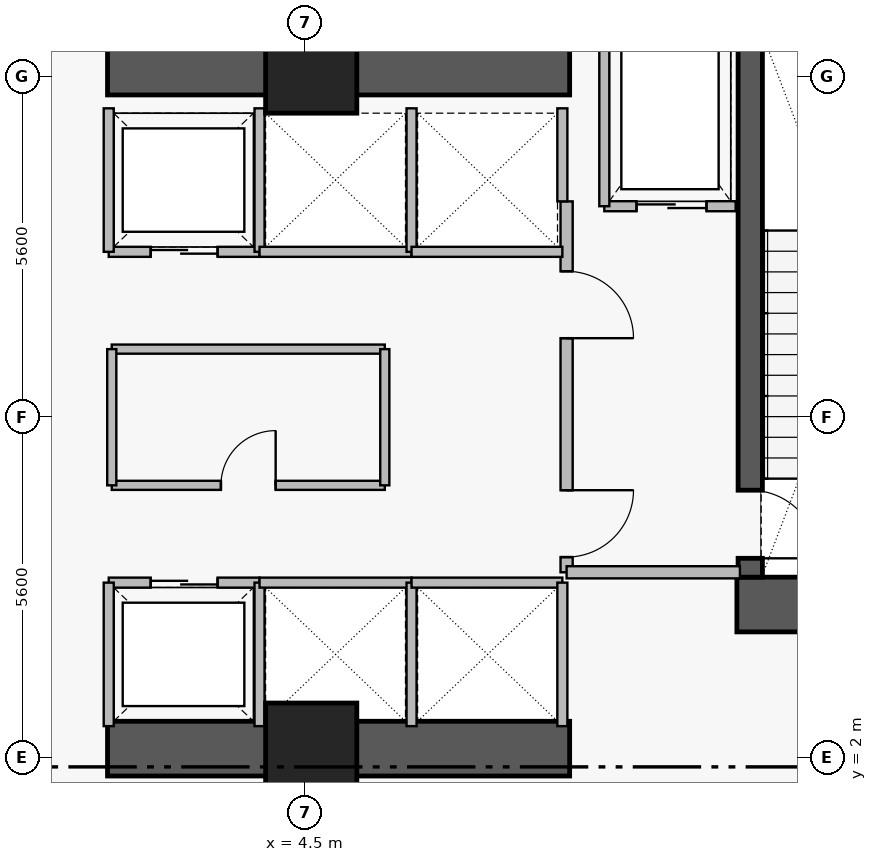
"""IFC4 building model, lengths in metres.
Left out: names, types, materials, properties, quantities, classifications, styles, units other than length and angle.
Written with IfcOpenShell. Run it as: python <this file> out.ifc"""

import sys

from ifc_helpers import new_model, si_unit, direction, frame, frame_2d, origin, origin_2d, place, context, subcontext, project, spatial, rectangle, extrude, element, fill, save


model = new_model("IFC4")
c1 = context("Model", 3, precision=1e-05, world=origin(), true_north=direction((0.0, 1.0)))
c2 = subcontext(c1, "Body", "Model", "MODEL_VIEW")
j1 = project(units=[si_unit("LENGTHUNIT", "METRE"), si_unit("PLANEANGLEUNIT", "RADIAN")], contexts=[c1])
p1 = place(None, origin())
s1 = spatial("IfcSite", under=j1, at=p1, CompositionType="ELEMENT")
p2 = place(p1, origin())
s2 = spatial("IfcBuilding", under=s1, at=p2, CompositionType="ELEMENT")
p3 = place(p2, frame((0.0, 0.0, 18.0)))
s3 = spatial("IfcBuildingStorey", under=s2, at=p3, CompositionType="ELEMENT", Elevation=18.0)
p4 = place(p3, frame((11.6, 4.52, 0.0), z_axis=(0.0, 0.0, 1.0), x_axis=(1.0, 0.0, 0.0)))
e1 = element("IfcWall", 1, at=p4, inside=s3, PredefinedType="SHEAR", context=c2, shape_type="SweptSolid", body=[
    extrude(rectangle(XDim=4.71, YDim=0.9, at=frame_2d((2.355, 0.0))), origin(), (0.0, 0.0, 1.0), 4.61),
])
for number, where, z_axis, x_axis in (
    (2, (1.25, 2.15, 0.0), (0.0, 0.0, 1.0), (1.0, 0.0, 0.0)),
    (3, (1.25, 13.35, 0.0), (0.0, 0.0, 1.0), (1.0, 0.0, 0.0)),
):
    element("IfcWall", number, at=place(p3, frame(where, z_axis=z_axis, x_axis=x_axis)), inside=s3, PredefinedType="SHEAR", context=c2, shape_type="SweptSolid", body=[
        extrude(rectangle(XDim=7.6, YDim=0.9, at=frame_2d((3.8, 0.0))), origin(), (0.0, 0.0, 1.0), 4.54),
    ])
p5 = place(p3, frame((11.82, 13.93, 0.0), z_axis=(0.0, 0.0, 1.0), x_axis=(0.0, -1.0, 0.0)))
e4 = element("IfcWall", 4, at=p5, inside=s3, PredefinedType="SHEAR", context=c2, shape_type="SweptSolid", body=[
    extrude(rectangle(XDim=8.96, YDim=0.4, at=frame_2d((4.48, 0.0))), origin(), (0.0, 0.0, 1.0), 4.61),
])
p6 = place(p5, frame((7.53, 0.0, 0.0)))
e5 = element("IfcOpeningElement", 5, at=p6, cuts=e4, PredefinedType="OPENING", context=c2, shape_type="SweptSolid", body=[
    extrude(rectangle(XDim=1.12, YDim=2.22, at=frame_2d((0.56, 1.11))), frame((0.0, 0.21, 0.0), z_axis=(0.0, -1.0, 0.0), x_axis=(1.0, 0.0, 0.0)), (0.0, 0.0, 1.0), 0.42),
])
for number, where, z_axis, x_axis in (
    (6, (4.6, 13.35, 0.0), (0.0, 0.0, 1.0), (1.0, 0.0, 0.0)),
    (7, (4.6, 2.15, 0.0), (0.0, 0.0, 1.0), (1.0, 0.0, 0.0)),
):
    element("IfcColumn", number, at=place(p3, frame(where, z_axis=z_axis, x_axis=x_axis)), inside=s3, PredefinedType="COLUMN", context=c2, shape_type="SweptSolid", body=[
        extrude(rectangle(XDim=1.5, YDim=1.5, at=origin_2d()), origin(), (0.0, 0.0, 1.0), 4.8),
    ])
p7 = place(p3, frame((8.8, 11.15, 0.0), z_axis=(0.0, 0.0, 1.0), x_axis=(0.0, -1.0, 0.0)))
e8 = element("IfcWall", 8, at=p7, inside=s3, PredefinedType="PARTITIONING", context=c2, shape_type="SweptSolid", body=[
    extrude(rectangle(XDim=6.1, YDim=0.2, at=frame_2d((3.05, 0.0))), origin(), (0.0, 0.0, 1.0), 4.54),
])
p8 = place(p7, frame((1.15, 0.0, 0.0)))
e9 = element("IfcOpeningElement", 9, at=p8, cuts=e8, PredefinedType="OPENING", context=c2, shape_type="SweptSolid", body=[
    extrude(rectangle(XDim=1.1, YDim=2.2, at=frame_2d((0.55, 1.1))), frame((0.0, 0.11, 0.0), z_axis=(0.0, -1.0, 0.0), x_axis=(1.0, 0.0, 0.0)), (0.0, 0.0, 1.0), 0.22),
])
p9 = place(p7, frame((4.75, 0.0, 0.0)))
e10 = element("IfcOpeningElement", 10, at=p9, cuts=e8, PredefinedType="OPENING", context=c2, shape_type="SweptSolid", body=[
    extrude(rectangle(XDim=1.1, YDim=2.2, at=frame_2d((0.55, 1.1))), frame((0.0, 0.11, 0.0), z_axis=(0.0, -1.0, 0.0), x_axis=(1.0, 0.0, 0.0)), (0.0, 0.0, 1.0), 0.22),
])
p10 = place(p3, frame((9.42, 11.07, 0.0), z_axis=(0.0, 0.0, 1.0), x_axis=(1.0, 0.0, 0.0)))
e11 = element("IfcWall", 11, at=p10, inside=s3, PredefinedType="PARTITIONING", context=c2, shape_type="SweptSolid", body=[
    extrude(rectangle(XDim=2.16, YDim=0.165, at=frame_2d((1.08, 0.0))), origin(), (0.0, 0.0, 1.0), 4.54),
])
p11 = place(p10, frame((0.53, 0.0, 0.0)))
e12 = element("IfcOpeningElement", 12, at=p11, cuts=e11, PredefinedType="OPENING", context=c2, shape_type="SweptSolid", body=[
    extrude(rectangle(XDim=1.15, YDim=2.25, at=frame_2d((0.575, 1.125))), frame((0.0, 0.093, 0.0), z_axis=(0.0, -1.0, 0.0), x_axis=(1.0, 0.0, 0.0)), (0.0, 0.0, 1.0), 0.185),
])
p12 = place(p3, frame((1.27, 4.88, 0.0), z_axis=(0.0, 0.0, 1.0), x_axis=(1.0, 0.0, 0.0)))
e13 = element("IfcWall", 13, at=p12, inside=s3, PredefinedType="PARTITIONING", context=c2, shape_type="SweptSolid", body=[
    extrude(rectangle(XDim=2.48, YDim=0.165, at=frame_2d((1.24, 0.0))), origin(), (0.0, 0.0, 1.0), 4.54),
])
p13 = place(p12, frame((0.69, 0.0, 0.0)))
e14 = element("IfcOpeningElement", 14, at=p13, cuts=e13, PredefinedType="OPENING", context=c2, shape_type="SweptSolid", body=[
    extrude(rectangle(XDim=1.1, YDim=2.25, at=frame_2d((0.55, 1.125))), frame((0.0, 0.093, 0.0), z_axis=(0.0, -1.0, 0.0), x_axis=(1.0, 0.0, 0.0)), (0.0, 0.0, 1.0), 0.185),
])
p14 = place(p3, frame((1.27, 10.32, 0.0), z_axis=(0.0, 0.0, 1.0), x_axis=(1.0, 0.0, 0.0)))
e15 = element("IfcWall", 15, at=p14, inside=s3, PredefinedType="PARTITIONING", context=c2, shape_type="SweptSolid", body=[
    extrude(rectangle(XDim=2.48, YDim=0.165, at=frame_2d((1.24, 0.0))), origin(), (0.0, 0.0, 1.0), 4.54),
])
p15 = place(p14, frame((0.69, 0.0, 0.0)))
e16 = element("IfcOpeningElement", 16, at=p15, cuts=e15, PredefinedType="OPENING", context=c2, shape_type="SweptSolid", body=[
    extrude(rectangle(XDim=1.1, YDim=2.25, at=frame_2d((0.55, 1.125))), frame((0.0, 0.093, 0.0), z_axis=(0.0, -1.0, 0.0), x_axis=(1.0, 0.0, 0.0)), (0.0, 0.0, 1.0), 0.185),
])
p16 = place(p3, frame((1.32, 6.48, 0.0), z_axis=(0.0, 0.0, 1.0), x_axis=(1.0, 0.0, 0.0)))
e17 = element("IfcWall", 17, at=p16, inside=s3, PredefinedType="PARTITIONING", context=c2, shape_type="SweptSolid", body=[
    extrude(rectangle(XDim=4.49, YDim=0.15, at=frame_2d((2.245, 0.0))), origin(), (0.0, 0.0, 1.0), 4.54),
])
p17 = place(p16, frame((1.795, 0.0, 0.0)))
e18 = element("IfcOpeningElement", 18, at=p17, cuts=e17, PredefinedType="OPENING", context=c2, shape_type="SweptSolid", body=[
    extrude(rectangle(XDim=0.9, YDim=2.15, at=frame_2d((0.45, 1.075))), frame((0.0, 0.085, 0.0), z_axis=(0.0, -1.0, 0.0), x_axis=(1.0, 0.0, 0.0)), (0.0, 0.0, 1.0), 0.17),
])
p18 = place(p3, frame((8.8, 5.05, 0.0), z_axis=(0.0, 0.0, 1.0), x_axis=(1.0, 0.0, 0.0)))
e19 = element("IfcWall", 19, at=p18, inside=s3, PredefinedType="PARTITIONING", context=c2, shape_type="SweptSolid", body=[
    extrude(rectangle(XDim=2.85, YDim=0.2, at=frame_2d((1.425, 0.0))), origin(), (0.0, 0.0, 1.0), 4.54),
])
p19 = place(p3, frame((9.42, 11.07, 0.0), z_axis=(0.0, 0.0, 1.0), x_axis=(0.0, 1.0, 0.0)))
e20 = element("IfcWall", 20, at=p19, inside=s3, PredefinedType="PARTITIONING", context=c2, shape_type="SweptSolid", body=[
    extrude(rectangle(XDim=2.96, YDim=0.165, at=frame_2d((1.48, 0.0))), origin(), (0.0, 0.0, 1.0), 4.54),
])
for number, where, z_axis, x_axis in (
    (21, (1.27, 2.52, 0.0), (0.0, 0.0, 1.0), (0.0, 1.0, 0.0)),
    (22, (3.75, 2.52, 0.0), (0.0, 0.0, 1.0), (0.0, 1.0, 0.0)),
    (23, (1.27, 10.32, 0.0), (0.0, 0.0, 1.0), (0.0, 1.0, 0.0)),
    (24, (3.75, 10.32, 0.0), (0.0, 0.0, 1.0), (0.0, 1.0, 0.0)),
):
    element("IfcWall", number, at=place(p3, frame(where, z_axis=z_axis, x_axis=x_axis)), inside=s3, PredefinedType="PARTITIONING", context=c2, shape_type="SweptSolid", body=[
        extrude(rectangle(XDim=2.36, YDim=0.165, at=frame_2d((1.18, 0.0))), origin(), (0.0, 0.0, 1.0), 4.54),
    ])
p20 = place(p3, frame((3.75, 4.88, 0.0), z_axis=(0.0, 0.0, 1.0), x_axis=(1.0, 0.0, 0.0)))
e25 = element("IfcWall", 25, at=p20, inside=s3, PredefinedType="PARTITIONING", context=c2, shape_type="SweptSolid", body=[
    extrude(rectangle(XDim=2.5, YDim=0.165, at=frame_2d((1.25, 0.0))), origin(), (0.0, 0.0, 1.0), 4.54),
])
p21 = place(p3, frame((6.25, 2.52, 0.0), z_axis=(0.0, 0.0, 1.0), x_axis=(0.0, 1.0, 0.0)))
e26 = element("IfcWall", 26, at=p21, inside=s3, PredefinedType="PARTITIONING", context=c2, shape_type="SweptSolid", body=[
    extrude(rectangle(XDim=2.36, YDim=0.165, at=frame_2d((1.18, 0.0))), origin(), (0.0, 0.0, 1.0), 4.54),
])
p22 = place(p3, frame((6.25, 4.88, 0.0), z_axis=(0.0, 0.0, 1.0), x_axis=(1.0, 0.0, 0.0)))
e27 = element("IfcWall", 27, at=p22, inside=s3, PredefinedType="PARTITIONING", context=c2, shape_type="SweptSolid", body=[
    extrude(rectangle(XDim=2.48, YDim=0.165, at=frame_2d((1.24, 0.0))), origin(), (0.0, 0.0, 1.0), 4.54),
])
p23 = place(p3, frame((8.73, 2.52, 0.0), z_axis=(0.0, 0.0, 1.0), x_axis=(0.0, 1.0, 0.0)))
e28 = element("IfcWall", 28, at=p23, inside=s3, PredefinedType="PARTITIONING", context=c2, shape_type="SweptSolid", body=[
    extrude(rectangle(XDim=2.36, YDim=0.165, at=frame_2d((1.18, 0.0))), origin(), (0.0, 0.0, 1.0), 4.54),
])
p24 = place(p3, frame((3.75, 10.32, 0.0), z_axis=(0.0, 0.0, 1.0), x_axis=(1.0, 0.0, 0.0)))
e29 = element("IfcWall", 29, at=p24, inside=s3, PredefinedType="PARTITIONING", context=c2, shape_type="SweptSolid", body=[
    extrude(rectangle(XDim=2.5, YDim=0.165, at=frame_2d((1.25, 0.0))), origin(), (0.0, 0.0, 1.0), 4.54),
])
p25 = place(p3, frame((6.25, 10.32, 0.0), z_axis=(0.0, 0.0, 1.0), x_axis=(0.0, 1.0, 0.0)))
e30 = element("IfcWall", 30, at=p25, inside=s3, PredefinedType="PARTITIONING", context=c2, shape_type="SweptSolid", body=[
    extrude(rectangle(XDim=2.36, YDim=0.165, at=frame_2d((1.18, 0.0))), origin(), (0.0, 0.0, 1.0), 4.54),
])
p26 = place(p3, frame((6.25, 10.32, 0.0), z_axis=(0.0, 0.0, 1.0), x_axis=(1.0, 0.0, 0.0)))
e31 = element("IfcWall", 31, at=p26, inside=s3, PredefinedType="PARTITIONING", context=c2, shape_type="SweptSolid", body=[
    extrude(rectangle(XDim=2.48, YDim=0.165, at=frame_2d((1.24, 0.0))), origin(), (0.0, 0.0, 1.0), 4.54),
])
p27 = place(p3, frame((8.73, 11.15, 0.0), z_axis=(0.0, 0.0, 1.0), x_axis=(0.0, 1.0, 0.0)))
e32 = element("IfcWall", 32, at=p27, inside=s3, PredefinedType="PARTITIONING", context=c2, shape_type="SweptSolid", body=[
    extrude(rectangle(XDim=1.53, YDim=0.165, at=frame_2d((0.765, 0.0))), origin(), (0.0, 0.0, 1.0), 4.54),
])
p28 = place(p3, frame((1.32, 8.72, 0.0), z_axis=(0.0, 0.0, 1.0), x_axis=(1.0, 0.0, 0.0)))
e33 = element("IfcWall", 33, at=p28, inside=s3, PredefinedType="PARTITIONING", context=c2, shape_type="SweptSolid", body=[
    extrude(rectangle(XDim=4.49, YDim=0.15, at=frame_2d((2.245, 0.0))), origin(), (0.0, 0.0, 1.0), 4.54),
])
for number, where, z_axis, x_axis in (
    (34, (1.32, 6.48, 0.0), (0.0, 0.0, 1.0), (0.0, 1.0, 0.0)),
    (35, (5.81, 6.48, 0.0), (0.0, 0.0, 1.0), (0.0, 1.0, 0.0)),
):
    element("IfcWall", number, at=place(p3, frame(where, z_axis=z_axis, x_axis=x_axis)), inside=s3, PredefinedType="PARTITIONING", context=c2, shape_type="SweptSolid", body=[
        extrude(rectangle(XDim=2.24, YDim=0.15, at=frame_2d((1.12, 0.0))), origin(), (0.0, 0.0, 1.0), 4.54),
    ])
p29 = place(p6, origin())
e36 = element("IfcDoor", 36, at=p29, inside=s3, OperationType="SINGLE_SWING_RIGHT", PredefinedType="DOOR", context=c2, shape_type="SweptSolid", body=[
    extrude(rectangle(XDim=1.12, YDim=2.22, at=frame_2d((0.56, 1.11))), frame((0.0, 0.025, 0.0), z_axis=(0.0, -1.0, 0.0), x_axis=(1.0, 0.0, 0.0)), (0.0, 0.0, 1.0), 0.05),
])
fill(e5, e36)
p30 = place(p8, origin())
e37 = element("IfcDoor", 37, at=p30, inside=s3, OperationType="SINGLE_SWING_RIGHT", PredefinedType="DOOR", context=c2, shape_type="SweptSolid", body=[
    extrude(rectangle(XDim=1.1, YDim=2.2, at=frame_2d((0.55, 1.1))), frame((0.0, 0.025, 0.0), z_axis=(0.0, -1.0, 0.0), x_axis=(1.0, 0.0, 0.0)), (0.0, 0.0, 1.0), 0.05),
])
fill(e9, e37)
p31 = place(p9, origin())
e38 = element("IfcDoor", 38, at=p31, inside=s3, OperationType="SINGLE_SWING_LEFT", PredefinedType="DOOR", context=c2, shape_type="SweptSolid", body=[
    extrude(rectangle(XDim=1.1, YDim=2.2, at=frame_2d((0.55, 1.1))), frame((0.0, 0.025, 0.0), z_axis=(0.0, -1.0, 0.0), x_axis=(1.0, 0.0, 0.0)), (0.0, 0.0, 1.0), 0.05),
])
fill(e10, e38)
p32 = place(p11, origin())
e39 = element("IfcDoor", 39, at=p32, inside=s3, OperationType="SLIDING_TO_LEFT", PredefinedType="DOOR", context=c2, shape_type="SweptSolid", body=[
    extrude(rectangle(XDim=1.15, YDim=2.25, at=frame_2d((0.575, 1.125))), frame((0.0, 0.025, 0.0), z_axis=(0.0, -1.0, 0.0), x_axis=(1.0, 0.0, 0.0)), (0.0, 0.0, 1.0), 0.05),
])
fill(e12, e39)
p33 = place(p13, origin())
e40 = element("IfcDoor", 40, at=p33, inside=s3, OperationType="SLIDING_TO_LEFT", PredefinedType="DOOR", context=c2, shape_type="SweptSolid", body=[
    extrude(rectangle(XDim=1.1, YDim=2.25, at=frame_2d((0.55, 1.125))), frame((0.0, 0.025, 0.0), z_axis=(0.0, -1.0, 0.0), x_axis=(1.0, 0.0, 0.0)), (0.0, 0.0, 1.0), 0.05),
])
fill(e14, e40)
p34 = place(p15, origin())
e41 = element("IfcDoor", 41, at=p34, inside=s3, OperationType="SLIDING_TO_LEFT", PredefinedType="DOOR", context=c2, shape_type="SweptSolid", body=[
    extrude(rectangle(XDim=1.1, YDim=2.25, at=frame_2d((0.55, 1.125))), frame((0.0, 0.025, 0.0), z_axis=(0.0, -1.0, 0.0), x_axis=(1.0, 0.0, 0.0)), (0.0, 0.0, 1.0), 0.05),
])
fill(e16, e41)
p35 = place(p17, origin())
e42 = element("IfcDoor", 42, at=p35, inside=s3, OperationType="SINGLE_SWING_RIGHT", PredefinedType="DOOR", context=c2, shape_type="SweptSolid", body=[
    extrude(rectangle(XDim=0.9, YDim=2.15, at=frame_2d((0.45, 1.075))), frame((0.0, 0.025, 0.0), z_axis=(0.0, -1.0, 0.0), x_axis=(1.0, 0.0, 0.0)), (0.0, 0.0, 1.0), 0.05),
])
fill(e18, e42)
save(model, sys.argv[1])
